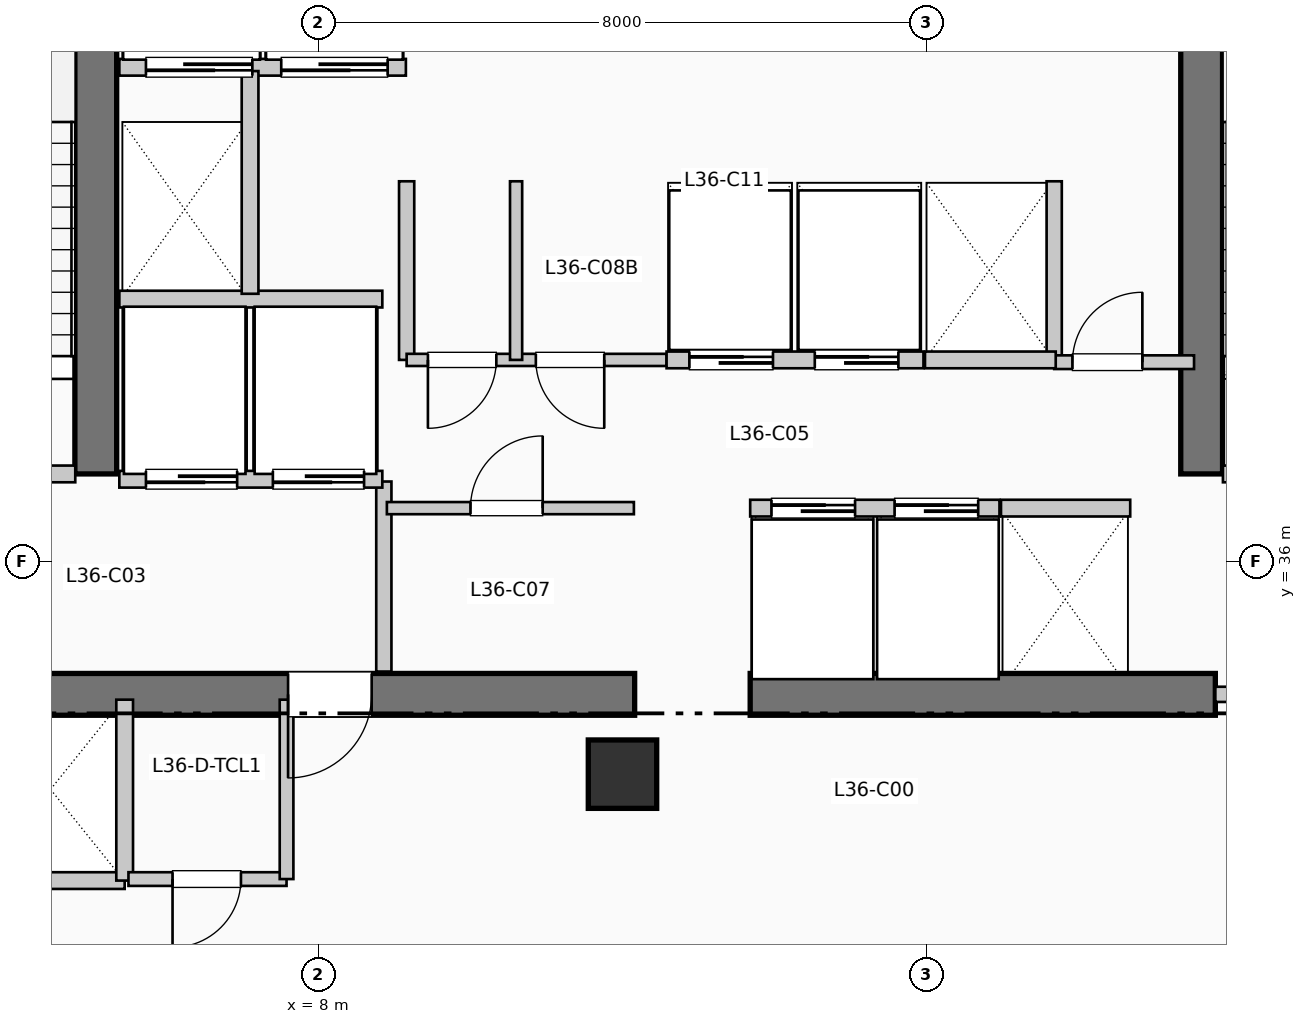
"""IFC4 building model, lengths in metres.
Left out: names, types, materials, properties, quantities, classifications, styles, units other than length and angle.
Written with IfcOpenShell. Run it as: python <this file> out.ifc"""

import sys

from ifc_helpers import new_model, si_unit, direction, frame, frame_2d, origin, origin_2d, place, context, subcontext, project, spatial, rectangle, extrude, element, fill, save


model = new_model("IFC4")
c1 = context("Model", 3, precision=1e-05, world=origin(), true_north=direction((0.0, 1.0)))
c2 = subcontext(c1, "Body", "Model", "MODEL_VIEW")
j1 = project(units=[si_unit("LENGTHUNIT", "METRE"), si_unit("PLANEANGLEUNIT", "RADIAN")], contexts=[c1])
p1 = place(None, origin())
s1 = spatial("IfcSite", under=j1, at=p1, CompositionType="ELEMENT")
p2 = place(p1, origin())
s2 = spatial("IfcBuilding", under=s1, at=p2, CompositionType="ELEMENT")
p3 = place(p2, frame((0.0, 0.0, 150.81)))
s3 = spatial("IfcBuildingStorey", under=s2, at=p3, CompositionType="ELEMENT", Elevation=150.81)
p4 = place(p3, frame((1.45, 34.25, 0.0), z_axis=(0.0, 0.0, 1.0), x_axis=(1.0, 0.0, 0.0)))
e1 = element("IfcWall", 1, at=p4, inside=s3, PredefinedType="SHEAR", context=c2, shape_type="SweptSolid", body=[
    extrude(rectangle(XDim=10.71, YDim=0.55, at=frame_2d((5.355, 0.0))), origin(), (0.0, 0.0, 1.0), 3.96),
])
p5 = place(p4, frame((7.25, 0.0, 0.0), z_axis=(0.0, 0.0, 1.0), x_axis=(-1.0, 0.0, 0.0)))
e2 = element("IfcOpeningElement", 2, at=p5, cuts=e1, PredefinedType="OPENING", context=c2, shape_type="SweptSolid", body=[
    extrude(rectangle(XDim=1.1, YDim=2.15, at=frame_2d((0.55, 1.075))), frame((0.0, 0.285, 0.0), z_axis=(0.0, -1.0, 0.0), x_axis=(1.0, 0.0, 0.0)), (0.0, 0.0, 1.0), 0.57),
])
p6 = place(p3, frame((13.68, 34.25, 0.0), z_axis=(0.0, 0.0, 1.0), x_axis=(1.0, 0.0, 0.0)))
e3 = element("IfcWall", 3, at=p6, inside=s3, PredefinedType="SHEAR", context=c2, shape_type="SweptSolid", body=[
    extrude(rectangle(XDim=6.12, YDim=0.55, at=frame_2d((3.06, 0.0))), origin(), (0.0, 0.0, 1.0), 3.96),
])
for number, where, z_axis, x_axis in (
    (4, (5.07, 37.15, 0.0), (0.0, 0.0, 1.0), (0.0, 1.0, 0.0)),
    (5, (19.62, 37.15, 0.0), (0.0, 0.0, 1.0), (0.0, 1.0, 0.0)),
):
    element("IfcWall", number, at=place(p3, frame(where, z_axis=z_axis, x_axis=x_axis)), inside=s3, PredefinedType="SHEAR", context=c2, shape_type="SweptSolid", body=[
        extrude(rectangle(XDim=7.89, YDim=0.55, at=frame_2d((3.945, 0.0))), origin(), (0.0, 0.0, 1.0), 3.96),
    ])
p7 = place(p3, frame((12.0, 33.2, 0.0), z_axis=(0.0, 0.0, 1.0), x_axis=(1.0, 0.0, 0.0)))
e6 = element("IfcColumn", 6, at=p7, inside=s3, PredefinedType="COLUMN", context=c2, shape_type="SweptSolid", body=[
    extrude(rectangle(XDim=0.9, YDim=0.9, at=origin_2d()), origin(), (0.0, 0.0, 1.0), 3.96),
])
p8 = place(p3, frame((1.65, 37.15, 0.0), z_axis=(0.0, 0.0, 1.0), x_axis=(1.0, 0.0, 0.0)))
e7 = element("IfcWall", 7, at=p8, inside=s3, PredefinedType="PARTITIONING", context=c2, shape_type="SweptSolid", body=[
    extrude(rectangle(XDim=3.15, YDim=0.22, at=frame_2d((1.575, 0.0))), origin(), (0.0, 0.0, 1.0), 3.71),
])
p9 = place(p8, frame((2.05, 0.0, 0.0), z_axis=(0.0, 0.0, 1.0), x_axis=(-1.0, 0.0, 0.0)))
e8 = element("IfcOpeningElement", 8, at=p9, cuts=e7, PredefinedType="OPENING", context=c2, shape_type="SweptSolid", body=[
    extrude(rectangle(XDim=1.05, YDim=2.15, at=frame_2d((0.525, 1.075))), frame((0.0, 0.12, 0.0), z_axis=(0.0, -1.0, 0.0), x_axis=(1.0, 0.0, 0.0)), (0.0, 0.0, 1.0), 0.24),
])
p10 = place(p3, frame((8.86, 34.55, 0.0), z_axis=(0.0, 0.0, 1.0), x_axis=(0.0, 1.0, 0.0)))
e9 = element("IfcWall", 9, at=p10, inside=s3, PredefinedType="PARTITIONING", context=c2, shape_type="SweptSolid", body=[
    extrude(rectangle(XDim=2.5, YDim=0.2, at=frame_2d((1.25, 0.0))), origin(), (0.0, 0.0, 1.0), 3.71),
])
p11 = place(p3, frame((19.9, 37.15, 0.0), z_axis=(0.0, 0.0, 1.0), x_axis=(1.0, 0.0, 0.0)))
e10 = element("IfcWall", 10, at=p11, inside=s3, PredefinedType="PARTITIONING", context=c2, shape_type="SweptSolid", body=[
    extrude(rectangle(XDim=3.15, YDim=0.22, at=frame_2d((1.575, 0.0))), origin(), (0.0, 0.0, 1.0), 3.71),
])
p12 = place(p11, frame((2.05, 0.0, 0.0), z_axis=(0.0, 0.0, 1.0), x_axis=(-1.0, 0.0, 0.0)))
e11 = element("IfcOpeningElement", 11, at=p12, cuts=e10, PredefinedType="OPENING", context=c2, shape_type="SweptSolid", body=[
    extrude(rectangle(XDim=1.05, YDim=2.15, at=frame_2d((0.525, 1.075))), frame((0.0, 0.12, 0.0), z_axis=(0.0, -1.0, 0.0), x_axis=(1.0, 0.0, 0.0)), (0.0, 0.0, 1.0), 0.24),
])
p13 = place(p3, frame((19.8, 34.25, 0.0), z_axis=(0.0, 0.0, 1.0), x_axis=(1.0, 0.0, 0.0)))
e12 = element("IfcWall", 12, at=p13, inside=s3, PredefinedType="PARTITIONING", context=c2, shape_type="SweptSolid", body=[
    extrude(rectangle(XDim=3.25, YDim=0.2, at=frame_2d((1.625, 0.0))), origin(), (0.0, 0.0, 1.0), 3.71),
])
p14 = place(p13, frame((2.15, 0.0, 0.0), z_axis=(0.0, 0.0, 1.0), x_axis=(-1.0, 0.0, 0.0)))
e13 = element("IfcOpeningElement", 13, at=p14, cuts=e12, PredefinedType="OPENING", context=c2, shape_type="SweptSolid", body=[
    extrude(rectangle(XDim=1.1, YDim=2.15, at=frame_2d((0.55, 1.075))), frame((0.0, 0.11, 0.0), z_axis=(0.0, -1.0, 0.0), x_axis=(1.0, 0.0, 0.0)), (0.0, 0.0, 1.0), 0.22),
])
p15 = place(p3, frame((5.38, 37.08, 0.0), z_axis=(0.0, 0.0, 1.0), x_axis=(1.0, 0.0, 0.0)))
e14 = element("IfcWall", 14, at=p15, inside=s3, PredefinedType="PARTITIONING", context=c2, shape_type="SweptSolid", body=[
    extrude(rectangle(XDim=3.46, YDim=0.22, at=frame_2d((1.73, 0.0))), origin(), (0.0, 0.0, 1.0), 3.71),
])
p16 = place(p15, frame((1.55, 0.0, 0.0), z_axis=(0.0, 0.0, 1.0), x_axis=(-1.0, 0.0, 0.0)))
e15 = element("IfcOpeningElement", 15, at=p16, cuts=e14, PredefinedType="OPENING", context=c2, shape_type="SweptSolid", body=[
    extrude(rectangle(XDim=1.2, YDim=2.2, at=frame_2d((0.6, 1.1))), frame((0.0, 0.12, 0.0), z_axis=(0.0, -1.0, 0.0), x_axis=(1.0, 0.0, 0.0)), (0.0, 0.0, 1.0), 0.24),
])
p17 = place(p15, frame((3.22, 0.0, 0.0), z_axis=(0.0, 0.0, 1.0), x_axis=(-1.0, 0.0, 0.0)))
e16 = element("IfcOpeningElement", 16, at=p17, cuts=e14, PredefinedType="OPENING", context=c2, shape_type="SweptSolid", body=[
    extrude(rectangle(XDim=1.2, YDim=2.2, at=frame_2d((0.6, 1.1))), frame((0.0, 0.12, 0.0), z_axis=(0.0, -1.0, 0.0), x_axis=(1.0, 0.0, 0.0)), (0.0, 0.0, 1.0), 0.24),
])
p18 = place(p3, frame((5.38, 39.45, 0.0), z_axis=(0.0, 0.0, 1.0), x_axis=(1.0, 0.0, 0.0)))
e17 = element("IfcWall", 17, at=p18, inside=s3, PredefinedType="PARTITIONING", context=c2, shape_type="SweptSolid", body=[
    extrude(rectangle(XDim=3.46, YDim=0.22, at=frame_2d((1.73, 0.0))), origin(), (0.0, 0.0, 1.0), 3.71),
])
p19 = place(p3, frame((5.38, 42.5, 0.0), z_axis=(0.0, 0.0, 1.0), x_axis=(1.0, 0.0, 0.0)))
e18 = element("IfcWall", 18, at=p19, inside=s3, PredefinedType="PARTITIONING", context=c2, shape_type="SweptSolid", body=[
    extrude(rectangle(XDim=3.77, YDim=0.22, at=frame_2d((1.885, 0.0))), origin(), (0.0, 0.0, 1.0), 3.71),
])
p20 = place(p19, frame((1.75, 0.0, 0.0), z_axis=(0.0, 0.0, 1.0), x_axis=(-1.0, 0.0, 0.0)))
e19 = element("IfcOpeningElement", 19, at=p20, cuts=e18, PredefinedType="OPENING", context=c2, shape_type="SweptSolid", body=[
    extrude(rectangle(XDim=1.4, YDim=2.2, at=frame_2d((0.7, 1.1))), frame((0.0, 0.12, 0.0), z_axis=(0.0, -1.0, 0.0), x_axis=(1.0, 0.0, 0.0)), (0.0, 0.0, 1.0), 0.24),
])
p21 = place(p19, frame((3.53, 0.0, 0.0), z_axis=(0.0, 0.0, 1.0), x_axis=(-1.0, 0.0, 0.0)))
e20 = element("IfcOpeningElement", 20, at=p21, cuts=e18, PredefinedType="OPENING", context=c2, shape_type="SweptSolid", body=[
    extrude(rectangle(XDim=1.4, YDim=2.2, at=frame_2d((0.7, 1.1))), frame((0.0, 0.12, 0.0), z_axis=(0.0, -1.0, 0.0), x_axis=(1.0, 0.0, 0.0)), (0.0, 0.0, 1.0), 0.24),
])
p22 = place(p3, frame((7.1, 39.52, 0.0), z_axis=(0.0, 0.0, 1.0), x_axis=(0.0, 1.0, 0.0)))
e21 = element("IfcWall", 21, at=p22, inside=s3, PredefinedType="PARTITIONING", context=c2, shape_type="SweptSolid", body=[
    extrude(rectangle(XDim=2.93, YDim=0.22, at=frame_2d((1.465, 0.0))), origin(), (0.0, 0.0, 1.0), 3.71),
])
p23 = place(p3, frame((1.55, 31.8, 0.0), z_axis=(0.0, 0.0, 1.0), x_axis=(1.0, 0.0, 0.0)))
e22 = element("IfcWall", 22, at=p23, inside=s3, PredefinedType="PARTITIONING", context=c2, shape_type="SweptSolid", body=[
    extrude(rectangle(XDim=3.9, YDim=0.22, at=frame_2d((1.95, 0.0))), origin(), (0.0, 0.0, 1.0), 3.71),
])
p24 = place(p3, frame((5.45, 31.8, 0.0), z_axis=(0.0, 0.0, 1.0), x_axis=(0.0, 1.0, 0.0)))
e23 = element("IfcWall", 23, at=p24, inside=s3, PredefinedType="PARTITIONING", context=c2, shape_type="SweptSolid", body=[
    extrude(rectangle(XDim=2.38, YDim=0.22, at=frame_2d((1.19, 0.0))), origin(), (0.0, 0.0, 1.0), 3.71),
])
for number, where, z_axis, x_axis in (
    (24, (9.16, 38.65, 0.0), (0.0, 0.0, 1.0), (0.0, 1.0, 0.0)),
    (25, (17.68, 38.65, 0.0), (0.0, 0.0, 1.0), (0.0, 1.0, 0.0)),
):
    element("IfcWall", number, at=place(p3, frame(where, z_axis=z_axis, x_axis=x_axis)), inside=s3, PredefinedType="PARTITIONING", context=c2, shape_type="SweptSolid", body=[
        extrude(rectangle(XDim=2.35, YDim=0.2, at=frame_2d((1.175, 0.0))), origin(), (0.0, 0.0, 1.0), 3.71),
    ])
p25 = place(p3, frame((17.68, 38.62, 0.0), z_axis=(0.0, 0.0, 1.0), x_axis=(1.0, 0.0, 0.0)))
e26 = element("IfcWall", 26, at=p25, inside=s3, PredefinedType="PARTITIONING", context=c2, shape_type="SweptSolid", body=[
    extrude(rectangle(XDim=1.84, YDim=0.18, at=frame_2d((0.92, 0.0))), origin(), (0.0, 0.0, 1.0), 3.71),
])
p26 = place(p25, frame((0.24, 0.0, 0.0)))
e27 = element("IfcOpeningElement", 27, at=p26, cuts=e26, PredefinedType="OPENING", context=c2, shape_type="SweptSolid", body=[
    extrude(rectangle(XDim=0.92, YDim=2.1, at=frame_2d((0.46, 1.05))), frame((0.0, 0.1, 0.0), z_axis=(0.0, -1.0, 0.0), x_axis=(1.0, 0.0, 0.0)), (0.0, 0.0, 1.0), 0.2),
])
p27 = place(p3, frame((5.5, 31.82, 0.0), z_axis=(0.0, 0.0, 1.0), x_axis=(1.0, 0.0, 0.0)))
e28 = element("IfcWall", 28, at=p27, inside=s3, PredefinedType="PLUMBINGWALL", context=c2, shape_type="SweptSolid", body=[
    extrude(rectangle(XDim=2.08, YDim=0.18, at=frame_2d((1.04, 0.0))), origin(), (0.0, 0.0, 1.0), 3.71),
])
p28 = place(p27, frame((1.48, 0.0, 0.0), z_axis=(0.0, 0.0, 1.0), x_axis=(-1.0, 0.0, 0.0)))
e29 = element("IfcOpeningElement", 29, at=p28, cuts=e28, PredefinedType="OPENING", context=c2, shape_type="SweptSolid", body=[
    extrude(rectangle(XDim=0.9, YDim=2.1, at=frame_2d((0.45, 1.05))), frame((0.0, 0.1, 0.0), z_axis=(0.0, -1.0, 0.0), x_axis=(1.0, 0.0, 0.0)), (0.0, 0.0, 1.0), 0.2),
])
p29 = place(p3, frame((7.58, 31.82, 0.0), z_axis=(0.0, 0.0, 1.0), x_axis=(0.0, 1.0, 0.0)))
e30 = element("IfcWall", 30, at=p29, inside=s3, PredefinedType="PLUMBINGWALL", context=c2, shape_type="SweptSolid", body=[
    extrude(rectangle(XDim=2.36, YDim=0.18, at=frame_2d((1.18, 0.0))), origin(), (0.0, 0.0, 1.0), 3.71),
])
p30 = place(p3, frame((8.9, 36.7, 0.0), z_axis=(0.0, 0.0, 1.0), x_axis=(1.0, 0.0, 0.0)))
e31 = element("IfcWall", 31, at=p30, inside=s3, PredefinedType="PARTITIONING", context=c2, shape_type="SweptSolid", body=[
    extrude(rectangle(XDim=3.25, YDim=0.16, at=frame_2d((1.625, 0.0))), origin(), (0.0, 0.0, 1.0), 3.71),
])
p31 = place(p30, frame((1.1, 0.0, 0.0)))
e32 = element("IfcOpeningElement", 32, at=p31, cuts=e31, PredefinedType="OPENING", context=c2, shape_type="SweptSolid", body=[
    extrude(rectangle(XDim=0.95, YDim=2.15, at=frame_2d((0.475, 1.075))), frame((0.0, 0.09, 0.0), z_axis=(0.0, -1.0, 0.0), x_axis=(1.0, 0.0, 0.0)), (0.0, 0.0, 1.0), 0.18),
])
p32 = place(p3, frame((9.16, 38.65, 0.0), z_axis=(0.0, 0.0, 1.0), x_axis=(1.0, 0.0, 0.0)))
e33 = element("IfcWall", 33, at=p32, inside=s3, PredefinedType="PARTITIONING", context=c2, shape_type="SweptSolid", body=[
    extrude(rectangle(XDim=3.42, YDim=0.16, at=frame_2d((1.71, 0.0))), origin(), (0.0, 0.0, 1.0), 3.71),
])
p33 = place(p32, frame((1.18, 0.0, 0.0), z_axis=(0.0, 0.0, 1.0), x_axis=(-1.0, 0.0, 0.0)))
e34 = element("IfcOpeningElement", 34, at=p33, cuts=e33, PredefinedType="OPENING", context=c2, shape_type="SweptSolid", body=[
    extrude(rectangle(XDim=0.9, YDim=2.15, at=frame_2d((0.45, 1.075))), frame((0.0, 0.09, 0.0), z_axis=(0.0, -1.0, 0.0), x_axis=(1.0, 0.0, 0.0)), (0.0, 0.0, 1.0), 0.18),
])
p34 = place(p32, frame((2.6, 0.0, 0.0), z_axis=(0.0, 0.0, 1.0), x_axis=(-1.0, 0.0, 0.0)))
e35 = element("IfcOpeningElement", 35, at=p34, cuts=e33, PredefinedType="OPENING", context=c2, shape_type="SweptSolid", body=[
    extrude(rectangle(XDim=0.9, YDim=2.15, at=frame_2d((0.45, 1.075))), frame((0.0, 0.09, 0.0), z_axis=(0.0, -1.0, 0.0), x_axis=(1.0, 0.0, 0.0)), (0.0, 0.0, 1.0), 0.18),
])
p35 = place(p3, frame((10.6, 38.65, 0.0), z_axis=(0.0, 0.0, 1.0), x_axis=(0.0, 1.0, 0.0)))
e36 = element("IfcWall", 36, at=p35, inside=s3, PredefinedType="PARTITIONING", context=c2, shape_type="SweptSolid", body=[
    extrude(rectangle(XDim=2.35, YDim=0.16, at=frame_2d((1.175, 0.0))), origin(), (0.0, 0.0, 1.0), 3.71),
])
p36 = place(p3, frame((13.68, 36.7, 0.0), z_axis=(0.0, 0.0, 1.0), x_axis=(1.0, 0.0, 0.0)))
e37 = element("IfcWall", 37, at=p36, inside=s3, PredefinedType="PARTITIONING", context=c2, shape_type="SweptSolid", body=[
    extrude(rectangle(XDim=3.28, YDim=0.22, at=frame_2d((1.64, 0.0))), origin(), (0.0, 0.0, 1.0), 3.71),
])
p37 = place(p36, frame((0.28, 0.0, 0.0)))
e38 = element("IfcOpeningElement", 38, at=p37, cuts=e37, PredefinedType="OPENING", context=c2, shape_type="SweptSolid", body=[
    extrude(rectangle(XDim=1.1, YDim=2.2, at=frame_2d((0.55, 1.1))), frame((0.0, 0.12, 0.0), z_axis=(0.0, -1.0, 0.0), x_axis=(1.0, 0.0, 0.0)), (0.0, 0.0, 1.0), 0.24),
])
p38 = place(p36, frame((1.9, 0.0, 0.0)))
e39 = element("IfcOpeningElement", 39, at=p38, cuts=e37, PredefinedType="OPENING", context=c2, shape_type="SweptSolid", body=[
    extrude(rectangle(XDim=1.1, YDim=2.2, at=frame_2d((0.55, 1.1))), frame((0.0, 0.12, 0.0), z_axis=(0.0, -1.0, 0.0), x_axis=(1.0, 0.0, 0.0)), (0.0, 0.0, 1.0), 0.24),
])
p39 = place(p3, frame((12.58, 38.65, 0.0), z_axis=(0.0, 0.0, 1.0), x_axis=(1.0, 0.0, 0.0)))
e40 = element("IfcWall", 40, at=p39, inside=s3, PredefinedType="PARTITIONING", context=c2, shape_type="SweptSolid", body=[
    extrude(rectangle(XDim=3.38, YDim=0.22, at=frame_2d((1.69, 0.0))), origin(), (0.0, 0.0, 1.0), 3.71),
])
p40 = place(p39, frame((0.3, 0.0, 0.0)))
e41 = element("IfcOpeningElement", 41, at=p40, cuts=e40, PredefinedType="OPENING", context=c2, shape_type="SweptSolid", body=[
    extrude(rectangle(XDim=1.1, YDim=2.2, at=frame_2d((0.55, 1.1))), frame((0.0, 0.12, 0.0), z_axis=(0.0, -1.0, 0.0), x_axis=(1.0, 0.0, 0.0)), (0.0, 0.0, 1.0), 0.24),
])
p41 = place(p39, frame((1.95, 0.0, 0.0)))
e42 = element("IfcOpeningElement", 42, at=p41, cuts=e40, PredefinedType="OPENING", context=c2, shape_type="SweptSolid", body=[
    extrude(rectangle(XDim=1.1, YDim=2.2, at=frame_2d((0.55, 1.1))), frame((0.0, 0.12, 0.0), z_axis=(0.0, -1.0, 0.0), x_axis=(1.0, 0.0, 0.0)), (0.0, 0.0, 1.0), 0.24),
])
p42 = place(p3, frame((16.98, 36.7, 0.0), z_axis=(0.0, 0.0, 1.0), x_axis=(1.0, 0.0, 0.0)))
e43 = element("IfcWall", 43, at=p42, inside=s3, PredefinedType="PARTITIONING", context=c2, shape_type="SweptSolid", body=[
    extrude(rectangle(XDim=1.7, YDim=0.22, at=frame_2d((0.85, 0.0))), origin(), (0.0, 0.0, 1.0), 3.71),
])
p43 = place(p3, frame((15.98, 38.65, 0.0), z_axis=(0.0, 0.0, 1.0), x_axis=(1.0, 0.0, 0.0)))
e44 = element("IfcWall", 44, at=p43, inside=s3, PredefinedType="PARTITIONING", context=c2, shape_type="SweptSolid", body=[
    extrude(rectangle(XDim=1.72, YDim=0.22, at=frame_2d((0.86, 0.0))), origin(), (0.0, 0.0, 1.0), 3.71),
])
p44 = place(p5, origin())
e45 = element("IfcDoor", 45, at=p44, inside=s3, OperationType="SINGLE_SWING_LEFT", PredefinedType="DOOR", context=c2, shape_type="SweptSolid", body=[
    extrude(rectangle(XDim=1.1, YDim=2.15, at=frame_2d((0.55, 1.075))), frame((0.0, 0.025, 0.0), z_axis=(0.0, -1.0, 0.0), x_axis=(1.0, 0.0, 0.0)), (0.0, 0.0, 1.0), 0.05),
])
fill(e2, e45)
p45 = place(p16, origin())
e46 = element("IfcDoor", 46, at=p45, inside=s3, OperationType="SLIDING_TO_RIGHT", PredefinedType="DOOR", context=c2, shape_type="SweptSolid", body=[
    extrude(rectangle(XDim=1.2, YDim=2.2, at=frame_2d((0.6, 1.1))), frame((0.0, 0.025, 0.0), z_axis=(0.0, -1.0, 0.0), x_axis=(1.0, 0.0, 0.0)), (0.0, 0.0, 1.0), 0.05),
])
fill(e15, e46)
p46 = place(p17, origin())
e47 = element("IfcDoor", 47, at=p46, inside=s3, OperationType="SLIDING_TO_RIGHT", PredefinedType="DOOR", context=c2, shape_type="SweptSolid", body=[
    extrude(rectangle(XDim=1.2, YDim=2.2, at=frame_2d((0.6, 1.1))), frame((0.0, 0.025, 0.0), z_axis=(0.0, -1.0, 0.0), x_axis=(1.0, 0.0, 0.0)), (0.0, 0.0, 1.0), 0.05),
])
fill(e16, e47)
p47 = place(p20, origin())
e48 = element("IfcDoor", 48, at=p47, inside=s3, OperationType="SLIDING_TO_LEFT", PredefinedType="DOOR", context=c2, shape_type="SweptSolid", body=[
    extrude(rectangle(XDim=1.4, YDim=2.2, at=frame_2d((0.7, 1.1))), frame((0.0, 0.025, 0.0), z_axis=(0.0, -1.0, 0.0), x_axis=(1.0, 0.0, 0.0)), (0.0, 0.0, 1.0), 0.05),
])
fill(e19, e48)
p48 = place(p21, origin())
e49 = element("IfcDoor", 49, at=p48, inside=s3, OperationType="SLIDING_TO_LEFT", PredefinedType="DOOR", context=c2, shape_type="SweptSolid", body=[
    extrude(rectangle(XDim=1.4, YDim=2.2, at=frame_2d((0.7, 1.1))), frame((0.0, 0.025, 0.0), z_axis=(0.0, -1.0, 0.0), x_axis=(1.0, 0.0, 0.0)), (0.0, 0.0, 1.0), 0.05),
])
fill(e20, e49)
p49 = place(p26, origin())
e50 = element("IfcDoor", 50, at=p49, inside=s3, OperationType="SINGLE_SWING_RIGHT", PredefinedType="DOOR", context=c2, shape_type="SweptSolid", body=[
    extrude(rectangle(XDim=0.92, YDim=2.1, at=frame_2d((0.46, 1.05))), frame((0.0, 0.025, 0.0), z_axis=(0.0, -1.0, 0.0), x_axis=(1.0, 0.0, 0.0)), (0.0, 0.0, 1.0), 0.05),
])
fill(e27, e50)
p50 = place(p28, origin())
e51 = element("IfcDoor", 51, at=p50, inside=s3, OperationType="SINGLE_SWING_LEFT", PredefinedType="DOOR", context=c2, shape_type="SweptSolid", body=[
    extrude(rectangle(XDim=0.9, YDim=2.1, at=frame_2d((0.45, 1.05))), frame((0.0, 0.025, 0.0), z_axis=(0.0, -1.0, 0.0), x_axis=(1.0, 0.0, 0.0)), (0.0, 0.0, 1.0), 0.05),
])
fill(e29, e51)
p51 = place(p31, origin())
e52 = element("IfcDoor", 52, at=p51, inside=s3, OperationType="SINGLE_SWING_RIGHT", PredefinedType="DOOR", context=c2, shape_type="SweptSolid", body=[
    extrude(rectangle(XDim=0.95, YDim=2.15, at=frame_2d((0.475, 1.075))), frame((0.0, 0.025, 0.0), z_axis=(0.0, -1.0, 0.0), x_axis=(1.0, 0.0, 0.0)), (0.0, 0.0, 1.0), 0.05),
])
fill(e32, e52)
p52 = place(p33, origin())
e53 = element("IfcDoor", 53, at=p52, inside=s3, OperationType="SINGLE_SWING_LEFT", PredefinedType="DOOR", context=c2, shape_type="SweptSolid", body=[
    extrude(rectangle(XDim=0.9, YDim=2.15, at=frame_2d((0.45, 1.075))), frame((0.0, 0.025, 0.0), z_axis=(0.0, -1.0, 0.0), x_axis=(1.0, 0.0, 0.0)), (0.0, 0.0, 1.0), 0.05),
])
fill(e34, e53)
p53 = place(p34, origin())
e54 = element("IfcDoor", 54, at=p53, inside=s3, OperationType="SINGLE_SWING_RIGHT", PredefinedType="DOOR", context=c2, shape_type="SweptSolid", body=[
    extrude(rectangle(XDim=0.9, YDim=2.15, at=frame_2d((0.45, 1.075))), frame((0.0, 0.025, 0.0), z_axis=(0.0, -1.0, 0.0), x_axis=(1.0, 0.0, 0.0)), (0.0, 0.0, 1.0), 0.05),
])
fill(e35, e54)
p54 = place(p37, origin())
e55 = element("IfcDoor", 55, at=p54, inside=s3, OperationType="SLIDING_TO_RIGHT", PredefinedType="DOOR", context=c2, shape_type="SweptSolid", body=[
    extrude(rectangle(XDim=1.1, YDim=2.2, at=frame_2d((0.55, 1.1))), frame((0.0, 0.025, 0.0), z_axis=(0.0, -1.0, 0.0), x_axis=(1.0, 0.0, 0.0)), (0.0, 0.0, 1.0), 0.05),
])
fill(e38, e55)
p55 = place(p38, origin())
e56 = element("IfcDoor", 56, at=p55, inside=s3, OperationType="SLIDING_TO_RIGHT", PredefinedType="DOOR", context=c2, shape_type="SweptSolid", body=[
    extrude(rectangle(XDim=1.1, YDim=2.2, at=frame_2d((0.55, 1.1))), frame((0.0, 0.025, 0.0), z_axis=(0.0, -1.0, 0.0), x_axis=(1.0, 0.0, 0.0)), (0.0, 0.0, 1.0), 0.05),
])
fill(e39, e56)
p56 = place(p40, origin())
e57 = element("IfcDoor", 57, at=p56, inside=s3, OperationType="SLIDING_TO_RIGHT", PredefinedType="DOOR", context=c2, shape_type="SweptSolid", body=[
    extrude(rectangle(XDim=1.1, YDim=2.2, at=frame_2d((0.55, 1.1))), frame((0.0, 0.025, 0.0), z_axis=(0.0, -1.0, 0.0), x_axis=(1.0, 0.0, 0.0)), (0.0, 0.0, 1.0), 0.05),
])
fill(e41, e57)
p57 = place(p41, origin())
e58 = element("IfcDoor", 58, at=p57, inside=s3, OperationType="SLIDING_TO_RIGHT", PredefinedType="DOOR", context=c2, shape_type="SweptSolid", body=[
    extrude(rectangle(XDim=1.1, YDim=2.2, at=frame_2d((0.55, 1.1))), frame((0.0, 0.025, 0.0), z_axis=(0.0, -1.0, 0.0), x_axis=(1.0, 0.0, 0.0)), (0.0, 0.0, 1.0), 0.05),
])
fill(e42, e58)
save(model, sys.argv[1])
